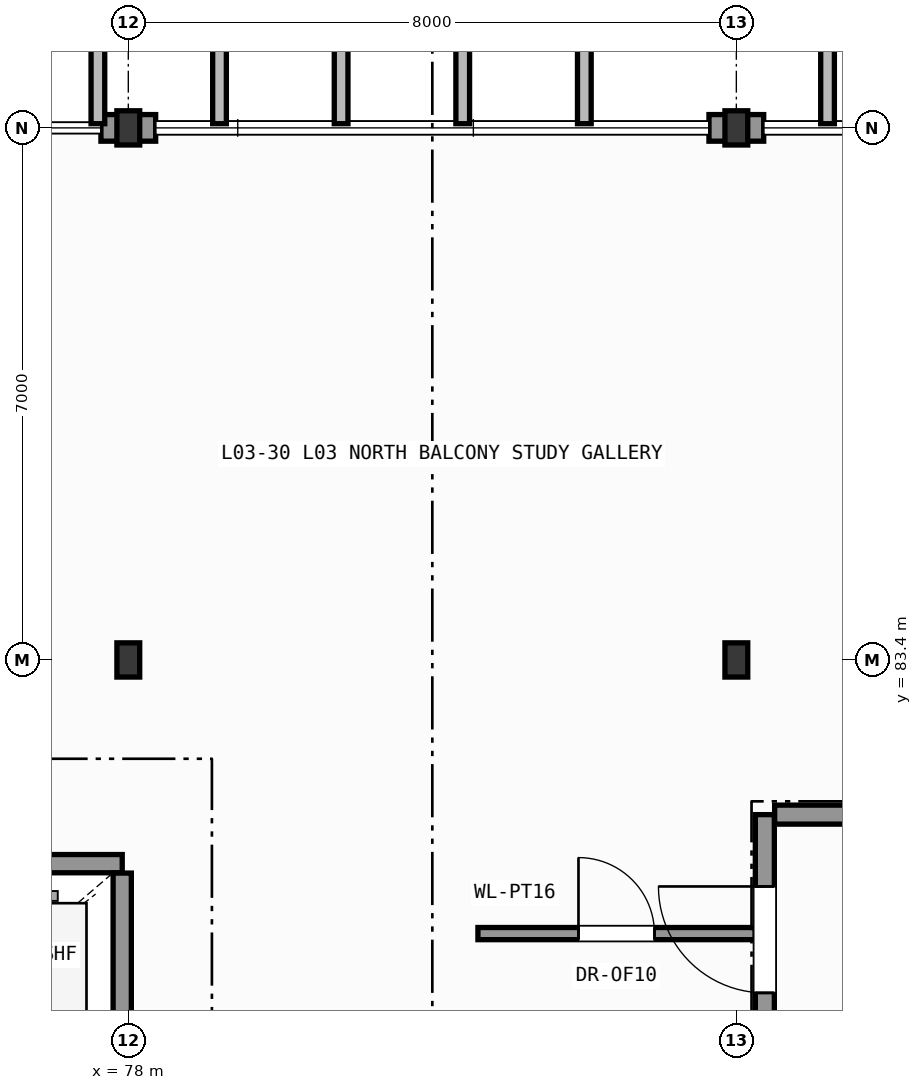
"""IFC4 building model, lengths in metres.
Left out: names, types, materials, properties, quantities, classifications, styles, units other than length and angle.
Written with IfcOpenShell. Run it as: python <this file> out.ifc"""

import sys

from ifc_helpers import new_model, si_unit, direction, frame, frame_2d, origin, origin_2d, place, context, subcontext, project, spatial, rectangle, i_section, extrude, element, fill, save


model = new_model("IFC4")
c1 = context("Model", 3, precision=1e-05, world=origin(), true_north=direction((0.0, 1.0)))
c2 = subcontext(c1, "Body", "Model", "MODEL_VIEW")
j1 = project(units=[si_unit("LENGTHUNIT", "METRE"), si_unit("PLANEANGLEUNIT", "RADIAN")], contexts=[c1])
p1 = place(None, origin())
s1 = spatial("IfcSite", under=j1, at=p1, CompositionType="ELEMENT")
p2 = place(p1, origin())
s2 = spatial("IfcBuilding", under=s1, at=p2, CompositionType="ELEMENT")
p3 = place(p2, frame((0.0, 0.0, 13.2)))
s3 = spatial("IfcBuildingStorey", under=s2, at=p3, CompositionType="ELEMENT", Elevation=13.2)
for number, where, z_axis, x_axis in (
    (1, (78.0, 83.4, 0.0), (0.0, 0.0, 1.0), (1.0, 0.0, 0.0)),
    (2, (78.0, 90.4, 0.0), (0.0, 0.0, 1.0), (1.0, 0.0, 0.0)),
    (3, (86.0, 83.4, 0.0), (0.0, 0.0, 1.0), (1.0, 0.0, 0.0)),
    (4, (86.0, 90.4, 0.0), (0.0, 0.0, 1.0), (1.0, 0.0, 0.0)),
):
    element("IfcColumn", number, at=place(p3, frame(where, z_axis=z_axis, x_axis=x_axis)), inside=s3, PredefinedType="COLUMN", context=c2, shape_type="SweptSolid", body=[
        extrude(i_section(OverallWidth=0.3, OverallDepth=0.45, WebThickness=0.014, FlangeThickness=0.026, FilletRadius=0.027, at=origin_2d()), origin(), (0.0, 0.0, 1.0), 4.8),
    ])
for number, where, z_axis, x_axis in (
    (5, (86.36, 90.4, 0.0), (0.0, 0.0, 1.0), (-1.0, 0.0, 0.0)),
    (6, (86.0, 90.4, 0.0), (0.0, 0.0, 1.0), (-1.0, 0.0, 0.0)),
    (7, (78.36, 90.4, 0.0), (0.0, 0.0, 1.0), (-1.0, 0.0, 0.0)),
    (8, (78.0, 90.4, 0.0), (0.0, 0.0, 1.0), (-1.0, 0.0, 0.0)),
):
    element("IfcWall", number, at=place(p3, frame(where, z_axis=z_axis, x_axis=x_axis)), inside=s3, PredefinedType="SOLIDWALL", context=c2, shape_type="SweptSolid", body=[
        extrude(rectangle(XDim=0.36, YDim=0.35, at=frame_2d((0.18, 0.0))), origin(), (0.0, 0.0, 1.0), 4.155),
    ])
p4 = place(p3, frame((86.375, 78.075, 0.0), z_axis=(0.0, 0.0, 1.0), x_axis=(0.0, 1.0, 0.0)))
e9 = element("IfcWall", 9, at=p4, inside=s3, PredefinedType="SHEAR", context=c2, shape_type="SweptSolid", body=[
    extrude(rectangle(XDim=3.29, YDim=0.25, at=frame_2d((1.645, 0.0))), origin(), (0.0, 0.0, 1.0), 4.56),
])
p5 = place(p4, frame((0.945, 0.0, 0.0)))
e10 = element("IfcOpeningElement", 10, at=p5, cuts=e9, PredefinedType="OPENING", context=c2, shape_type="SweptSolid", body=[
    extrude(rectangle(XDim=1.4, YDim=2.2, at=frame_2d((0.7, 1.1))), frame((0.0, 0.135, 0.0), z_axis=(0.0, -1.0, 0.0), x_axis=(1.0, 0.0, 0.0)), (0.0, 0.0, 1.0), 0.27),
])
p6 = place(p3, frame((86.504, 81.365, 0.0), z_axis=(0.0, 0.0, 1.0), x_axis=(1.0, 0.0, 0.0)))
e11 = element("IfcWall", 11, at=p6, inside=s3, PredefinedType="SHEAR", context=c2, shape_type="SweptSolid", body=[
    extrude(rectangle(XDim=6.892, YDim=0.25, at=frame_2d((3.446, 0.0))), origin(), (0.0, 0.0, 1.0), 4.56),
])
p7 = place(p3, frame((74.88, 80.72, 0.0), z_axis=(0.0, 0.0, 1.0), x_axis=(1.0, 0.0, 0.0)))
e12 = element("IfcWall", 12, at=p7, inside=s3, PredefinedType="SHEAR", context=c2, shape_type="SweptSolid", body=[
    extrude(rectangle(XDim=3.04, YDim=0.24, at=frame_2d((1.52, 0.0))), origin(), (0.0, 0.0, 1.0), 4.56),
])
p8 = place(p3, frame((77.92, 78.204, 0.0), z_axis=(0.0, 0.0, 1.0), x_axis=(0.0, 1.0, 0.0)))
e13 = element("IfcWall", 13, at=p8, inside=s3, PredefinedType="SHEAR", context=c2, shape_type="SweptSolid", body=[
    extrude(rectangle(XDim=2.392, YDim=0.24, at=frame_2d((1.196, 0.0))), origin(), (0.0, 0.0, 1.0), 4.56),
])
p9 = place(p3, frame((82.6, 79.8, 0.0), z_axis=(0.0, 0.0, 1.0), x_axis=(1.0, 0.0, 0.0)))
e14 = element("IfcWall", 14, at=p9, inside=s3, PredefinedType="PARTITIONING", context=c2, shape_type="SweptSolid", body=[
    extrude(rectangle(XDim=3.646, YDim=0.16, at=frame_2d((1.823, 0.0))), origin(), (0.0, 0.0, 1.0), 4.215),
])
p10 = place(p9, frame((1.323, 0.0, 0.0)))
e15 = element("IfcOpeningElement", 15, at=p10, cuts=e14, PredefinedType="OPENING", context=c2, shape_type="SweptSolid", body=[
    extrude(rectangle(XDim=1.0, YDim=2.15, at=frame_2d((0.5, 1.075))), frame((0.0, 0.09, 0.0), z_axis=(0.0, -1.0, 0.0), x_axis=(1.0, 0.0, 0.0)), (0.0, 0.0, 1.0), 0.18),
])
p11 = place(p5, origin())
e16 = element("IfcDoor", 16, at=p11, inside=s3, OperationType="SINGLE_SWING_RIGHT", PredefinedType="DOOR", context=c2, shape_type="SweptSolid", body=[
    extrude(rectangle(XDim=1.4, YDim=2.2, at=frame_2d((0.7, 1.1))), frame((0.0, 0.025, 0.0), z_axis=(0.0, -1.0, 0.0), x_axis=(1.0, 0.0, 0.0)), (0.0, 0.0, 1.0), 0.05),
])
fill(e10, e16)
p12 = place(p10, origin())
e17 = element("IfcDoor", 17, at=p12, inside=s3, OperationType="SINGLE_SWING_LEFT", PredefinedType="DOOR", context=c2, shape_type="SweptSolid", body=[
    extrude(rectangle(XDim=1.0, YDim=2.15, at=frame_2d((0.5, 1.075))), frame((0.0, 0.025, 0.0), z_axis=(0.0, -1.0, 0.0), x_axis=(1.0, 0.0, 0.0)), (0.0, 0.0, 1.0), 0.05),
])
fill(e15, e17)
save(model, sys.argv[1])
